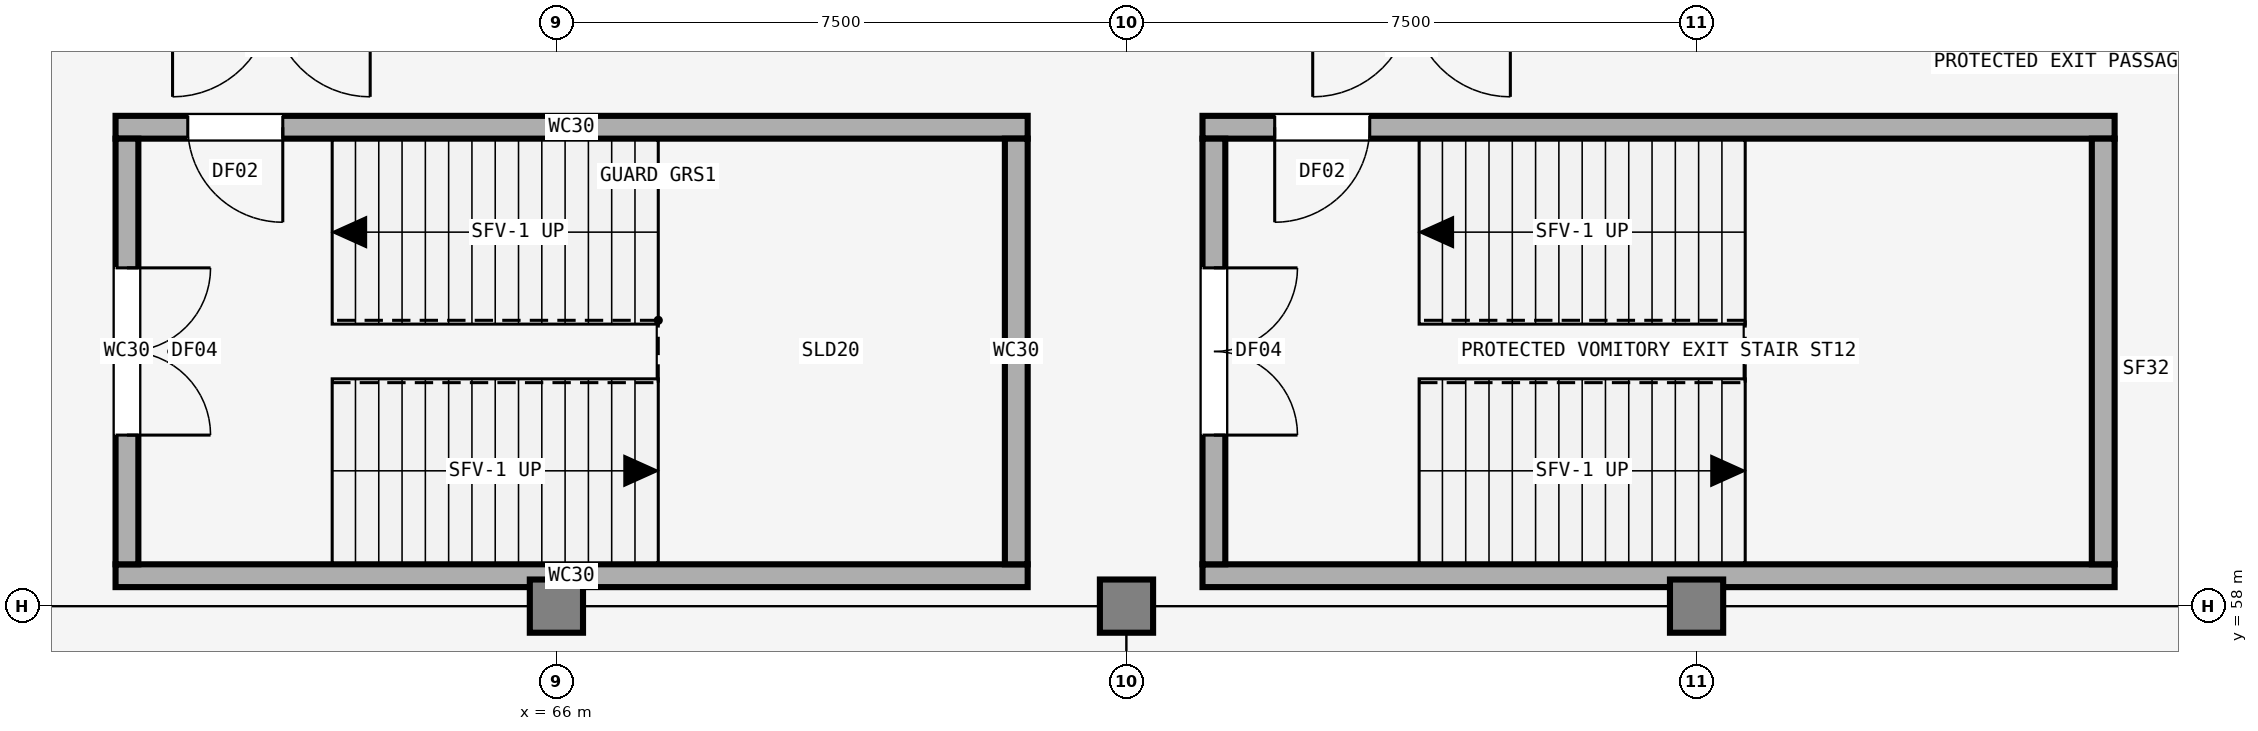
"""IFC4 building model, lengths in metres.
Left out: names, types, materials, properties, quantities, classifications, styles, units other than length and angle.
Written with IfcOpenShell. Run it as: python <this file> out.ifc"""

import sys

from ifc_helpers import new_model, si_unit, direction, frame, frame_2d, origin, origin_2d, place, context, subcontext, project, spatial, rectangle, extrude, element, fill, save


model = new_model("IFC4")
c1 = context("Model", 3, precision=1e-05, world=origin(), true_north=direction((0.0, 1.0)))
c2 = subcontext(c1, "Body", "Model", "MODEL_VIEW")
j1 = project(units=[si_unit("LENGTHUNIT", "METRE"), si_unit("PLANEANGLEUNIT", "RADIAN")], contexts=[c1])
p1 = place(None, origin())
s1 = spatial("IfcSite", under=j1, at=p1, CompositionType="ELEMENT")
p2 = place(p1, origin())
s2 = spatial("IfcBuilding", under=s1, at=p2, CompositionType="ELEMENT")
p3 = place(p2, origin())
s3 = spatial("IfcBuildingStorey", under=s2, at=p3, CompositionType="ELEMENT", Elevation=0.0)
for number, where, z_axis, x_axis in (
    (1, (66.0, 58.0, 0.0), (0.0, 0.0, 1.0), (1.0, 0.0, 0.0)),
    (2, (73.5, 58.0, 0.0), (0.0, 0.0, 1.0), (1.0, 0.0, 0.0)),
    (3, (81.0, 58.0, 0.0), (0.0, 0.0, 1.0), (1.0, 0.0, 0.0)),
):
    element("IfcColumn", number, at=place(p3, frame(where, z_axis=z_axis, x_axis=x_axis)), inside=s3, PredefinedType="COLUMN", context=c2, shape_type="SweptSolid", body=[
        extrude(rectangle(XDim=0.7, YDim=0.7, at=origin_2d()), origin(), (0.0, 0.0, 1.0), 4.8),
    ])
p4 = place(p3, frame((60.2, 58.4, 0.0), z_axis=(0.0, 0.0, 1.0), x_axis=(1.0, 0.0, 0.0)))
e4 = element("IfcWall", 4, at=p4, inside=s3, PredefinedType="SHEAR", context=c2, shape_type="SweptSolid", body=[
    extrude(rectangle(XDim=12.0, YDim=0.3, at=frame_2d((6.0, 0.0))), origin(), (0.0, 0.0, 1.0), 4.8),
])
p5 = place(p3, frame((72.2, 64.3, 0.0), z_axis=(0.0, 0.0, 1.0), x_axis=(-1.0, 0.0, 0.0)))
e5 = element("IfcWall", 5, at=p5, inside=s3, PredefinedType="SHEAR", context=c2, shape_type="SweptSolid", body=[
    extrude(rectangle(XDim=12.0, YDim=0.3, at=frame_2d((6.0, 0.0))), origin(), (0.0, 0.0, 1.0), 4.8),
])
p6 = place(p5, frame((9.8, 0.0, 0.0)))
e6 = element("IfcOpeningElement", 6, at=p6, cuts=e5, PredefinedType="OPENING", context=c2, shape_type="SweptSolid", body=[
    extrude(rectangle(XDim=1.25, YDim=2.15, at=frame_2d((0.625, 1.075))), frame((0.0, 0.16, 0.0), z_axis=(0.0, -1.0, 0.0), x_axis=(1.0, 0.0, 0.0)), (0.0, 0.0, 1.0), 0.32),
])
p7 = place(p3, frame((60.35, 64.15, 0.0), z_axis=(0.0, 0.0, 1.0), x_axis=(0.0, -1.0, 0.0)))
e7 = element("IfcWall", 7, at=p7, inside=s3, PredefinedType="SHEAR", context=c2, shape_type="SweptSolid", body=[
    extrude(rectangle(XDim=5.6, YDim=0.3, at=frame_2d((2.8, 0.0))), origin(), (0.0, 0.0, 1.0), 4.8),
])
p8 = place(p7, frame((1.7, 0.0, 0.0)))
e8 = element("IfcOpeningElement", 8, at=p8, cuts=e7, PredefinedType="OPENING", context=c2, shape_type="SweptSolid", body=[
    extrude(rectangle(XDim=2.2, YDim=2.25, at=frame_2d((1.1, 1.125))), frame((0.0, 0.16, 0.0), z_axis=(0.0, -1.0, 0.0), x_axis=(1.0, 0.0, 0.0)), (0.0, 0.0, 1.0), 0.32),
])
p9 = place(p3, frame((72.05, 58.55, 0.0), z_axis=(0.0, 0.0, 1.0), x_axis=(0.0, 1.0, 0.0)))
e9 = element("IfcWall", 9, at=p9, inside=s3, PredefinedType="SHEAR", context=c2, shape_type="SweptSolid", body=[
    extrude(rectangle(XDim=5.6, YDim=0.3, at=frame_2d((2.8, 0.0))), origin(), (0.0, 0.0, 1.0), 4.8),
])
p10 = place(p3, frame((74.5, 58.4, 0.0), z_axis=(0.0, 0.0, 1.0), x_axis=(1.0, 0.0, 0.0)))
e10 = element("IfcWall", 10, at=p10, inside=s3, PredefinedType="SHEAR", context=c2, shape_type="SweptSolid", body=[
    extrude(rectangle(XDim=12.0, YDim=0.3, at=frame_2d((6.0, 0.0))), origin(), (0.0, 0.0, 1.0), 4.8),
])
p11 = place(p3, frame((86.5, 64.3, 0.0), z_axis=(0.0, 0.0, 1.0), x_axis=(-1.0, 0.0, 0.0)))
e11 = element("IfcWall", 11, at=p11, inside=s3, PredefinedType="SHEAR", context=c2, shape_type="SweptSolid", body=[
    extrude(rectangle(XDim=12.0, YDim=0.3, at=frame_2d((6.0, 0.0))), origin(), (0.0, 0.0, 1.0), 4.8),
])
p12 = place(p11, frame((9.8, 0.0, 0.0)))
e12 = element("IfcOpeningElement", 12, at=p12, cuts=e11, PredefinedType="OPENING", context=c2, shape_type="SweptSolid", body=[
    extrude(rectangle(XDim=1.25, YDim=2.15, at=frame_2d((0.625, 1.075))), frame((0.0, 0.16, 0.0), z_axis=(0.0, -1.0, 0.0), x_axis=(1.0, 0.0, 0.0)), (0.0, 0.0, 1.0), 0.32),
])
p13 = place(p3, frame((74.65, 64.15, 0.0), z_axis=(0.0, 0.0, 1.0), x_axis=(0.0, -1.0, 0.0)))
e13 = element("IfcWall", 13, at=p13, inside=s3, PredefinedType="SHEAR", context=c2, shape_type="SweptSolid", body=[
    extrude(rectangle(XDim=5.6, YDim=0.3, at=frame_2d((2.8, 0.0))), origin(), (0.0, 0.0, 1.0), 4.8),
])
p14 = place(p13, frame((1.7, 0.0, 0.0)))
e14 = element("IfcOpeningElement", 14, at=p14, cuts=e13, PredefinedType="OPENING", context=c2, shape_type="SweptSolid", body=[
    extrude(rectangle(XDim=2.2, YDim=2.25, at=frame_2d((1.1, 1.125))), frame((0.0, 0.16, 0.0), z_axis=(0.0, -1.0, 0.0), x_axis=(1.0, 0.0, 0.0)), (0.0, 0.0, 1.0), 0.32),
])
p15 = place(p3, frame((86.35, 58.55, 0.0), z_axis=(0.0, 0.0, 1.0), x_axis=(0.0, 1.0, 0.0)))
e15 = element("IfcWall", 15, at=p15, inside=s3, PredefinedType="SHEAR", context=c2, shape_type="SweptSolid", body=[
    extrude(rectangle(XDim=5.6, YDim=0.3, at=frame_2d((2.8, 0.0))), origin(), (0.0, 0.0, 1.0), 4.8),
])
p16 = place(p8, origin())
e16 = element("IfcDoor", 16, at=p16, inside=s3, OperationType="DOUBLE_DOOR_SINGLE_SWING", PredefinedType="DOOR", context=c2, shape_type="SweptSolid", body=[
    extrude(rectangle(XDim=2.2, YDim=2.25, at=frame_2d((1.1, 1.125))), frame((0.0, 0.025, 0.0), z_axis=(0.0, -1.0, 0.0), x_axis=(1.0, 0.0, 0.0)), (0.0, 0.0, 1.0), 0.05),
])
fill(e8, e16)
p17 = place(p6, origin())
e17 = element("IfcDoor", 17, at=p17, inside=s3, OperationType="SINGLE_SWING_LEFT", PredefinedType="DOOR", context=c2, shape_type="SweptSolid", body=[
    extrude(rectangle(XDim=1.25, YDim=2.15, at=frame_2d((0.625, 1.075))), frame((0.0, 0.025, 0.0), z_axis=(0.0, -1.0, 0.0), x_axis=(1.0, 0.0, 0.0)), (0.0, 0.0, 1.0), 0.05),
])
fill(e6, e17)
p18 = place(p14, origin())
e18 = element("IfcDoor", 18, at=p18, inside=s3, OperationType="DOUBLE_DOOR_SINGLE_SWING", PredefinedType="DOOR", context=c2, shape_type="SweptSolid", body=[
    extrude(rectangle(XDim=2.2, YDim=2.25, at=frame_2d((1.1, 1.125))), frame((0.0, 0.025, 0.0), z_axis=(0.0, -1.0, 0.0), x_axis=(1.0, 0.0, 0.0)), (0.0, 0.0, 1.0), 0.05),
])
fill(e14, e18)
p19 = place(p12, origin())
e19 = element("IfcDoor", 19, at=p19, inside=s3, OperationType="SINGLE_SWING_RIGHT", PredefinedType="DOOR", context=c2, shape_type="SweptSolid", body=[
    extrude(rectangle(XDim=1.25, YDim=2.15, at=frame_2d((0.625, 1.075))), frame((0.0, 0.025, 0.0), z_axis=(0.0, -1.0, 0.0), x_axis=(1.0, 0.0, 0.0)), (0.0, 0.0, 1.0), 0.05),
])
fill(e12, e19)
save(model, sys.argv[1])
